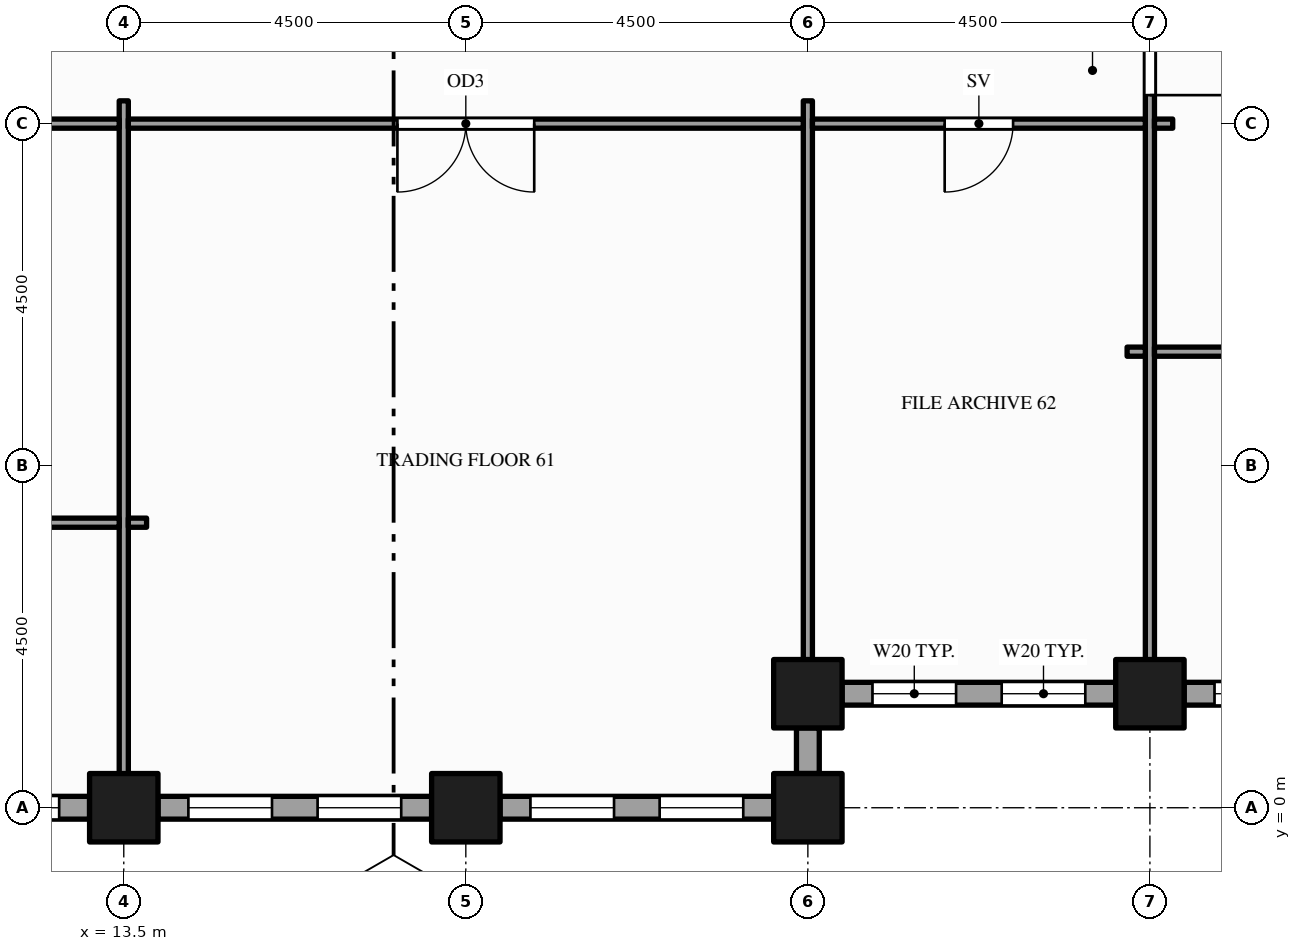
"""IFC4 building model, lengths in metres.
Left out: names, types, materials, properties, quantities, classifications, styles, units other than length and angle.
Written with IfcOpenShell. Run it as: python <this file> out.ifc"""

import sys

from ifc_helpers import new_model, si_unit, direction, frame, frame_2d, origin, origin_2d, place, context, subcontext, project, spatial, rectangle, hollow_rectangle, extrude, element, fill, save


model = new_model("IFC4")
c1 = context("Model", 3, precision=1e-05, world=origin(), true_north=direction((0.0, 1.0)))
c2 = subcontext(c1, "Body", "Model", "MODEL_VIEW")
j1 = project(units=[si_unit("LENGTHUNIT", "METRE"), si_unit("PLANEANGLEUNIT", "RADIAN")], contexts=[c1])
p1 = place(None, origin())
s1 = spatial("IfcSite", under=j1, at=p1, CompositionType="ELEMENT")
p2 = place(p1, origin())
s2 = spatial("IfcBuilding", under=s1, at=p2, CompositionType="ELEMENT")
p3 = place(p2, frame((0.0, 0.0, 183.0)))
s3 = spatial("IfcBuildingStorey", under=s2, at=p3, CompositionType="ELEMENT", Elevation=183.0)
for number, where, z_axis, x_axis in (
    (1, (13.5, 0.0, -0.15), (0.0, 0.0, 1.0), (1.0, 0.0, 0.0)),
    (2, (18.0, 0.0, -0.15), (0.0, 0.0, 1.0), (1.0, 0.0, 0.0)),
    (3, (22.5, 0.0, -0.15), (0.0, 0.0, 1.0), (1.0, 0.0, 0.0)),
    (4, (22.5, 1.5, -0.15), (0.0, 0.0, 1.0), (1.0, 0.0, 0.0)),
    (5, (27.0, 1.5, -0.15), (0.0, 0.0, 1.0), (1.0, 0.0, 0.0)),
):
    element("IfcColumn", number, at=place(p3, frame(where, z_axis=z_axis, x_axis=x_axis)), inside=s3, PredefinedType="COLUMN", context=c2, shape_type="SweptSolid", body=[
        extrude(hollow_rectangle(XDim=0.9, YDim=0.9, WallThickness=0.045, at=origin_2d()), origin(), (0.0, 0.0, 1.0), 3.9),
    ])
p4 = place(p3, frame((9.45, 0.0, 0.0), z_axis=(0.0, 0.0, 1.0), x_axis=(1.0, 0.0, 0.0)))
e6 = element("IfcWall", 6, at=p4, inside=s3, PredefinedType="STANDARD", context=c2, shape_type="SweptSolid", body=[
    extrude(rectangle(XDim=3.6, YDim=0.3, at=frame_2d((1.8, 0.0))), origin(), (0.0, 0.0, 1.0), 3.049),
])
p5 = place(p4, frame((0.4, 0.0, 0.9)))
e7 = element("IfcOpeningElement", 7, at=p5, cuts=e6, PredefinedType="OPENING", context=c2, shape_type="SweptSolid", body=[
    extrude(rectangle(XDim=1.1, YDim=2.0, at=frame_2d((0.55, 1.0))), frame((0.0, 0.16, 0.0), z_axis=(0.0, -1.0, 0.0), x_axis=(1.0, 0.0, 0.0)), (0.0, 0.0, 1.0), 0.32),
])
p6 = place(p4, frame((2.1, 0.0, 0.9)))
e8 = element("IfcOpeningElement", 8, at=p6, cuts=e6, PredefinedType="OPENING", context=c2, shape_type="SweptSolid", body=[
    extrude(rectangle(XDim=1.1, YDim=2.0, at=frame_2d((0.55, 1.0))), frame((0.0, 0.16, 0.0), z_axis=(0.0, -1.0, 0.0), x_axis=(1.0, 0.0, 0.0)), (0.0, 0.0, 1.0), 0.32),
])
p7 = place(p3, frame((13.95, 0.0, 0.0), z_axis=(0.0, 0.0, 1.0), x_axis=(1.0, 0.0, 0.0)))
e9 = element("IfcWall", 9, at=p7, inside=s3, PredefinedType="STANDARD", context=c2, shape_type="SweptSolid", body=[
    extrude(rectangle(XDim=3.6, YDim=0.3, at=frame_2d((1.8, 0.0))), origin(), (0.0, 0.0, 1.0), 3.049),
])
p8 = place(p7, frame((0.4, 0.0, 0.9)))
e10 = element("IfcOpeningElement", 10, at=p8, cuts=e9, PredefinedType="OPENING", context=c2, shape_type="SweptSolid", body=[
    extrude(rectangle(XDim=1.1, YDim=2.0, at=frame_2d((0.55, 1.0))), frame((0.0, 0.16, 0.0), z_axis=(0.0, -1.0, 0.0), x_axis=(1.0, 0.0, 0.0)), (0.0, 0.0, 1.0), 0.32),
])
p9 = place(p7, frame((2.1, 0.0, 0.9)))
e11 = element("IfcOpeningElement", 11, at=p9, cuts=e9, PredefinedType="OPENING", context=c2, shape_type="SweptSolid", body=[
    extrude(rectangle(XDim=1.1, YDim=2.0, at=frame_2d((0.55, 1.0))), frame((0.0, 0.16, 0.0), z_axis=(0.0, -1.0, 0.0), x_axis=(1.0, 0.0, 0.0)), (0.0, 0.0, 1.0), 0.32),
])
p10 = place(p3, frame((18.45, 0.0, 0.0), z_axis=(0.0, 0.0, 1.0), x_axis=(1.0, 0.0, 0.0)))
e12 = element("IfcWall", 12, at=p10, inside=s3, PredefinedType="STANDARD", context=c2, shape_type="SweptSolid", body=[
    extrude(rectangle(XDim=3.6, YDim=0.3, at=frame_2d((1.8, 0.0))), origin(), (0.0, 0.0, 1.0), 3.049),
])
p11 = place(p10, frame((0.4, 0.0, 0.9)))
e13 = element("IfcOpeningElement", 13, at=p11, cuts=e12, PredefinedType="OPENING", context=c2, shape_type="SweptSolid", body=[
    extrude(rectangle(XDim=1.1, YDim=2.0, at=frame_2d((0.55, 1.0))), frame((0.0, 0.16, 0.0), z_axis=(0.0, -1.0, 0.0), x_axis=(1.0, 0.0, 0.0)), (0.0, 0.0, 1.0), 0.32),
])
p12 = place(p10, frame((2.1, 0.0, 0.9)))
e14 = element("IfcOpeningElement", 14, at=p12, cuts=e12, PredefinedType="OPENING", context=c2, shape_type="SweptSolid", body=[
    extrude(rectangle(XDim=1.1, YDim=2.0, at=frame_2d((0.55, 1.0))), frame((0.0, 0.16, 0.0), z_axis=(0.0, -1.0, 0.0), x_axis=(1.0, 0.0, 0.0)), (0.0, 0.0, 1.0), 0.32),
])
p13 = place(p3, frame((22.5, 0.45, 0.0), z_axis=(0.0, 0.0, 1.0), x_axis=(0.0, 1.0, 0.0)))
e15 = element("IfcWall", 15, at=p13, inside=s3, PredefinedType="STANDARD", context=c2, shape_type="SweptSolid", body=[
    extrude(rectangle(XDim=0.6, YDim=0.3, at=frame_2d((0.3, 0.0))), origin(), (0.0, 0.0, 1.0), 3.049),
])
p14 = place(p3, frame((22.95, 1.5, 0.0), z_axis=(0.0, 0.0, 1.0), x_axis=(1.0, 0.0, 0.0)))
e16 = element("IfcWall", 16, at=p14, inside=s3, PredefinedType="STANDARD", context=c2, shape_type="SweptSolid", body=[
    extrude(rectangle(XDim=3.6, YDim=0.3, at=frame_2d((1.8, 0.0))), origin(), (0.0, 0.0, 1.0), 2.77),
])
p15 = place(p14, frame((0.4, 0.0, 0.9)))
e17 = element("IfcOpeningElement", 17, at=p15, cuts=e16, PredefinedType="OPENING", context=c2, shape_type="SweptSolid", body=[
    extrude(rectangle(XDim=1.1, YDim=1.5, at=frame_2d((0.55, 0.75))), frame((0.0, 0.16, 0.0), z_axis=(0.0, -1.0, 0.0), x_axis=(1.0, 0.0, 0.0)), (0.0, 0.0, 1.0), 0.32),
])
p16 = place(p14, frame((2.1, 0.0, 0.9)))
e18 = element("IfcOpeningElement", 18, at=p16, cuts=e16, PredefinedType="OPENING", context=c2, shape_type="SweptSolid", body=[
    extrude(rectangle(XDim=1.1, YDim=1.5, at=frame_2d((0.55, 0.75))), frame((0.0, 0.16, 0.0), z_axis=(0.0, -1.0, 0.0), x_axis=(1.0, 0.0, 0.0)), (0.0, 0.0, 1.0), 0.32),
])
p17 = place(p3, frame((27.45, 1.5, 0.0), z_axis=(0.0, 0.0, 1.0), x_axis=(1.0, 0.0, 0.0)))
e19 = element("IfcWall", 19, at=p17, inside=s3, PredefinedType="STANDARD", context=c2, shape_type="SweptSolid", body=[
    extrude(rectangle(XDim=3.6, YDim=0.3, at=frame_2d((1.8, 0.0))), origin(), (0.0, 0.0, 1.0), 2.77),
])
p18 = place(p17, frame((0.4, 0.0, 0.9)))
e20 = element("IfcOpeningElement", 20, at=p18, cuts=e19, PredefinedType="OPENING", context=c2, shape_type="SweptSolid", body=[
    extrude(rectangle(XDim=1.1, YDim=1.5, at=frame_2d((0.55, 0.75))), frame((0.0, 0.16, 0.0), z_axis=(0.0, -1.0, 0.0), x_axis=(1.0, 0.0, 0.0)), (0.0, 0.0, 1.0), 0.32),
])
p19 = place(p17, frame((2.1, 0.0, 0.9)))
e21 = element("IfcOpeningElement", 21, at=p19, cuts=e19, PredefinedType="OPENING", context=c2, shape_type="SweptSolid", body=[
    extrude(rectangle(XDim=1.1, YDim=1.5, at=frame_2d((0.55, 0.75))), frame((0.0, 0.16, 0.0), z_axis=(0.0, -1.0, 0.0), x_axis=(1.0, 0.0, 0.0)), (0.0, 0.0, 1.0), 0.32),
])
p20 = place(p3, frame((13.5, 0.15, 0.0), z_axis=(0.0, 0.0, 1.0), x_axis=(0.0, 1.0, 0.0)))
e22 = element("IfcWall", 22, at=p20, inside=s3, PredefinedType="PARTITIONING", context=c2, shape_type="SweptSolid", body=[
    extrude(rectangle(XDim=9.15, YDim=0.12, at=frame_2d((4.575, 0.0))), origin(), (0.0, 0.0, 1.0), 2.77),
])
p21 = place(p3, frame((22.5, 1.65, 0.0), z_axis=(0.0, 0.0, 1.0), x_axis=(0.0, 1.0, 0.0)))
e23 = element("IfcWall", 23, at=p21, inside=s3, PredefinedType="PARTITIONING", context=c2, shape_type="SweptSolid", body=[
    extrude(rectangle(XDim=7.65, YDim=0.12, at=frame_2d((3.825, 0.0))), origin(), (0.0, 0.0, 1.0), 2.77),
])
p22 = place(p3, frame((27.0, 1.65, 0.0), z_axis=(0.0, 0.0, 1.0), x_axis=(0.0, 1.0, 0.0)))
e24 = element("IfcWall", 24, at=p22, inside=s3, PredefinedType="PARTITIONING", context=c2, shape_type="SweptSolid", body=[
    extrude(rectangle(XDim=22.2, YDim=0.12, at=frame_2d((11.1, 0.0))), origin(), (0.0, 0.0, 1.0), 2.35),
])
p23 = place(p22, frame((7.725, 0.0, 0.0)))
e25 = element("IfcOpeningElement", 25, at=p23, cuts=e24, PredefinedType="OPENING", context=c2, shape_type="SweptSolid", body=[
    extrude(rectangle(XDim=1.5, YDim=2.1, at=frame_2d((0.75, 1.05))), frame((0.0, 0.07, 0.0), z_axis=(0.0, -1.0, 0.0), x_axis=(1.0, 0.0, 0.0)), (0.0, 0.0, 1.0), 0.14),
])
p24 = place(p22, frame((13.125, 0.0, 0.0)))
e26 = element("IfcOpeningElement", 26, at=p24, cuts=e24, PredefinedType="OPENING", context=c2, shape_type="SweptSolid", body=[
    extrude(rectangle(XDim=1.2, YDim=2.1, at=frame_2d((0.6, 1.05))), frame((0.0, 0.07, 0.0), z_axis=(0.0, -1.0, 0.0), x_axis=(1.0, 0.0, 0.0)), (0.0, 0.0, 1.0), 0.14),
])
p25 = place(p3, frame((9.125, 3.75, 0.0), z_axis=(0.0, 0.0, 1.0), x_axis=(1.0, 0.0, 0.0)))
e27 = element("IfcWall", 27, at=p25, inside=s3, PredefinedType="PARTITIONING", context=c2, shape_type="SweptSolid", body=[
    extrude(rectangle(XDim=4.315, YDim=0.12, at=frame_2d((2.157, 0.0))), origin(), (0.0, 0.0, 1.0), 2.77),
])
for number, where, z_axis, x_axis in (
    (28, (13.56, 3.75, 0.0), (0.0, 0.0, 1.0), (1.0, 0.0, 0.0)),
    (29, (26.7, 6.0, 0.0), (0.0, 0.0, 1.0), (1.0, 0.0, 0.0)),
):
    element("IfcWall", number, at=place(p3, frame(where, z_axis=z_axis, x_axis=x_axis)), inside=s3, PredefinedType="PARTITIONING", context=c2, shape_type="SweptSolid", body=[
        extrude(rectangle(XDim=0.24, YDim=0.12, at=frame_2d((0.12, 0.0))), origin(), (0.0, 0.0, 1.0), 2.77),
    ])
p26 = place(p3, frame((27.06, 6.0, 0.0), z_axis=(0.0, 0.0, 1.0), x_axis=(1.0, 0.0, 0.0)))
e30 = element("IfcWall", 30, at=p26, inside=s3, PredefinedType="PARTITIONING", context=c2, shape_type="SweptSolid", body=[
    extrude(rectangle(XDim=2.13, YDim=0.12, at=frame_2d((1.065, 0.0))), origin(), (0.0, 0.0, 1.0), 2.77),
])
p27 = place(p3, frame((0.15, 9.0, 0.0), z_axis=(0.0, 0.0, 1.0), x_axis=(1.0, 0.0, 0.0)))
e31 = element("IfcWall", 31, at=p27, inside=s3, PredefinedType="PARTITIONING", context=c2, shape_type="SweptSolid", body=[
    extrude(rectangle(XDim=13.29, YDim=0.12, at=frame_2d((6.645, 0.0))), origin(), (0.0, 0.0, 1.0), 2.77),
])
p28 = place(p27, frame((6.055, 0.0, 0.0)))
e32 = element("IfcOpeningElement", 32, at=p28, cuts=e31, PredefinedType="OPENING", context=c2, shape_type="SweptSolid", body=[
    extrude(rectangle(XDim=1.2, YDim=2.1, at=frame_2d((0.6, 1.05))), frame((0.0, 0.07, 0.0), z_axis=(0.0, -1.0, 0.0), x_axis=(1.0, 0.0, 0.0)), (0.0, 0.0, 1.0), 0.14),
])
p29 = place(p3, frame((13.56, 9.0, 0.0), z_axis=(0.0, 0.0, 1.0), x_axis=(1.0, 0.0, 0.0)))
e33 = element("IfcWall", 33, at=p29, inside=s3, PredefinedType="PARTITIONING", context=c2, shape_type="SweptSolid", body=[
    extrude(rectangle(XDim=8.88, YDim=0.12, at=frame_2d((4.44, 0.0))), origin(), (0.0, 0.0, 1.0), 2.77),
])
p30 = place(p29, frame((3.54, 0.0, 0.0)))
e34 = element("IfcOpeningElement", 34, at=p30, cuts=e33, PredefinedType="OPENING", context=c2, shape_type="SweptSolid", body=[
    extrude(rectangle(XDim=1.8, YDim=2.1, at=frame_2d((0.9, 1.05))), frame((0.0, 0.07, 0.0), z_axis=(0.0, -1.0, 0.0), x_axis=(1.0, 0.0, 0.0)), (0.0, 0.0, 1.0), 0.14),
])
p31 = place(p3, frame((22.56, 9.0, 0.0), z_axis=(0.0, 0.0, 1.0), x_axis=(1.0, 0.0, 0.0)))
e35 = element("IfcWall", 35, at=p31, inside=s3, PredefinedType="PARTITIONING", context=c2, shape_type="SweptSolid", body=[
    extrude(rectangle(XDim=4.38, YDim=0.12, at=frame_2d((2.19, 0.0))), origin(), (0.0, 0.0, 1.0), 2.77),
])
p32 = place(p31, frame((1.74, 0.0, 0.0)))
e36 = element("IfcOpeningElement", 36, at=p32, cuts=e35, PredefinedType="OPENING", context=c2, shape_type="SweptSolid", body=[
    extrude(rectangle(XDim=0.9, YDim=2.1, at=frame_2d((0.45, 1.05))), frame((0.0, 0.07, 0.0), z_axis=(0.0, -1.0, 0.0), x_axis=(1.0, 0.0, 0.0)), (0.0, 0.0, 1.0), 0.14),
])
p33 = place(p3, frame((27.06, 9.0, 0.0), z_axis=(0.0, 0.0, 1.0), x_axis=(1.0, 0.0, 0.0)))
e37 = element("IfcWall", 37, at=p33, inside=s3, PredefinedType="PARTITIONING", context=c2, shape_type="SweptSolid", body=[
    extrude(rectangle(XDim=0.24, YDim=0.12, at=frame_2d((0.12, 0.0))), origin(), (0.0, 0.0, 1.0), 2.77),
])
p34 = place(p6, origin())
e38 = element("IfcWindow", 38, at=p34, inside=s3, PartitioningType="SINGLE_PANEL", PredefinedType="WINDOW", context=c2, shape_type="SweptSolid", body=[
    extrude(rectangle(XDim=1.1, YDim=2.0, at=frame_2d((0.55, 1.0))), frame((0.0, 0.03, 0.0), z_axis=(0.0, -1.0, 0.0), x_axis=(1.0, 0.0, 0.0)), (0.0, 0.0, 1.0), 0.06),
])
fill(e8, e38)
p35 = place(p8, origin())
e39 = element("IfcWindow", 39, at=p35, inside=s3, PartitioningType="SINGLE_PANEL", PredefinedType="WINDOW", context=c2, shape_type="SweptSolid", body=[
    extrude(rectangle(XDim=1.1, YDim=2.0, at=frame_2d((0.55, 1.0))), frame((0.0, 0.03, 0.0), z_axis=(0.0, -1.0, 0.0), x_axis=(1.0, 0.0, 0.0)), (0.0, 0.0, 1.0), 0.06),
])
fill(e10, e39)
p36 = place(p9, origin())
e40 = element("IfcWindow", 40, at=p36, inside=s3, PartitioningType="SINGLE_PANEL", PredefinedType="WINDOW", context=c2, shape_type="SweptSolid", body=[
    extrude(rectangle(XDim=1.1, YDim=2.0, at=frame_2d((0.55, 1.0))), frame((0.0, 0.03, 0.0), z_axis=(0.0, -1.0, 0.0), x_axis=(1.0, 0.0, 0.0)), (0.0, 0.0, 1.0), 0.06),
])
fill(e11, e40)
p37 = place(p11, origin())
e41 = element("IfcWindow", 41, at=p37, inside=s3, PartitioningType="SINGLE_PANEL", PredefinedType="WINDOW", context=c2, shape_type="SweptSolid", body=[
    extrude(rectangle(XDim=1.1, YDim=2.0, at=frame_2d((0.55, 1.0))), frame((0.0, 0.03, 0.0), z_axis=(0.0, -1.0, 0.0), x_axis=(1.0, 0.0, 0.0)), (0.0, 0.0, 1.0), 0.06),
])
fill(e13, e41)
p38 = place(p12, origin())
e42 = element("IfcWindow", 42, at=p38, inside=s3, PartitioningType="SINGLE_PANEL", PredefinedType="WINDOW", context=c2, shape_type="SweptSolid", body=[
    extrude(rectangle(XDim=1.1, YDim=2.0, at=frame_2d((0.55, 1.0))), frame((0.0, 0.03, 0.0), z_axis=(0.0, -1.0, 0.0), x_axis=(1.0, 0.0, 0.0)), (0.0, 0.0, 1.0), 0.06),
])
fill(e14, e42)
p39 = place(p15, origin())
e43 = element("IfcWindow", 43, at=p39, inside=s3, PartitioningType="SINGLE_PANEL", PredefinedType="WINDOW", context=c2, shape_type="SweptSolid", body=[
    extrude(rectangle(XDim=1.1, YDim=1.5, at=frame_2d((0.55, 0.75))), frame((0.0, 0.03, 0.0), z_axis=(0.0, -1.0, 0.0), x_axis=(1.0, 0.0, 0.0)), (0.0, 0.0, 1.0), 0.06),
])
fill(e17, e43)
p40 = place(p16, origin())
e44 = element("IfcWindow", 44, at=p40, inside=s3, PartitioningType="SINGLE_PANEL", PredefinedType="WINDOW", context=c2, shape_type="SweptSolid", body=[
    extrude(rectangle(XDim=1.1, YDim=1.5, at=frame_2d((0.55, 0.75))), frame((0.0, 0.03, 0.0), z_axis=(0.0, -1.0, 0.0), x_axis=(1.0, 0.0, 0.0)), (0.0, 0.0, 1.0), 0.06),
])
fill(e18, e44)
p41 = place(p18, origin())
e45 = element("IfcWindow", 45, at=p41, inside=s3, PartitioningType="SINGLE_PANEL", PredefinedType="WINDOW", context=c2, shape_type="SweptSolid", body=[
    extrude(rectangle(XDim=1.1, YDim=1.5, at=frame_2d((0.55, 0.75))), frame((0.0, 0.03, 0.0), z_axis=(0.0, -1.0, 0.0), x_axis=(1.0, 0.0, 0.0)), (0.0, 0.0, 1.0), 0.06),
])
fill(e20, e45)
p42 = place(p23, origin())
e46 = element("IfcDoor", 46, at=p42, inside=s3, OperationType="SINGLE_SWING_LEFT", PredefinedType="DOOR", context=c2, shape_type="SweptSolid", body=[
    extrude(rectangle(XDim=1.5, YDim=2.1, at=frame_2d((0.75, 1.05))), frame((0.0, 0.025, 0.0), z_axis=(0.0, -1.0, 0.0), x_axis=(1.0, 0.0, 0.0)), (0.0, 0.0, 1.0), 0.05),
])
fill(e25, e46)
p43 = place(p30, origin())
e47 = element("IfcDoor", 47, at=p43, inside=s3, OperationType="DOUBLE_DOOR_SINGLE_SWING", PredefinedType="DOOR", context=c2, shape_type="SweptSolid", body=[
    extrude(rectangle(XDim=1.8, YDim=2.1, at=frame_2d((0.9, 1.05))), frame((0.0, 0.025, 0.0), z_axis=(0.0, -1.0, 0.0), x_axis=(1.0, 0.0, 0.0)), (0.0, 0.0, 1.0), 0.05),
])
fill(e34, e47)
p44 = place(p32, origin())
e48 = element("IfcDoor", 48, at=p44, inside=s3, OperationType="SINGLE_SWING_LEFT", PredefinedType="DOOR", context=c2, shape_type="SweptSolid", body=[
    extrude(rectangle(XDim=0.9, YDim=2.1, at=frame_2d((0.45, 1.05))), frame((0.0, 0.025, 0.0), z_axis=(0.0, -1.0, 0.0), x_axis=(1.0, 0.0, 0.0)), (0.0, 0.0, 1.0), 0.05),
])
fill(e36, e48)
save(model, sys.argv[1])
